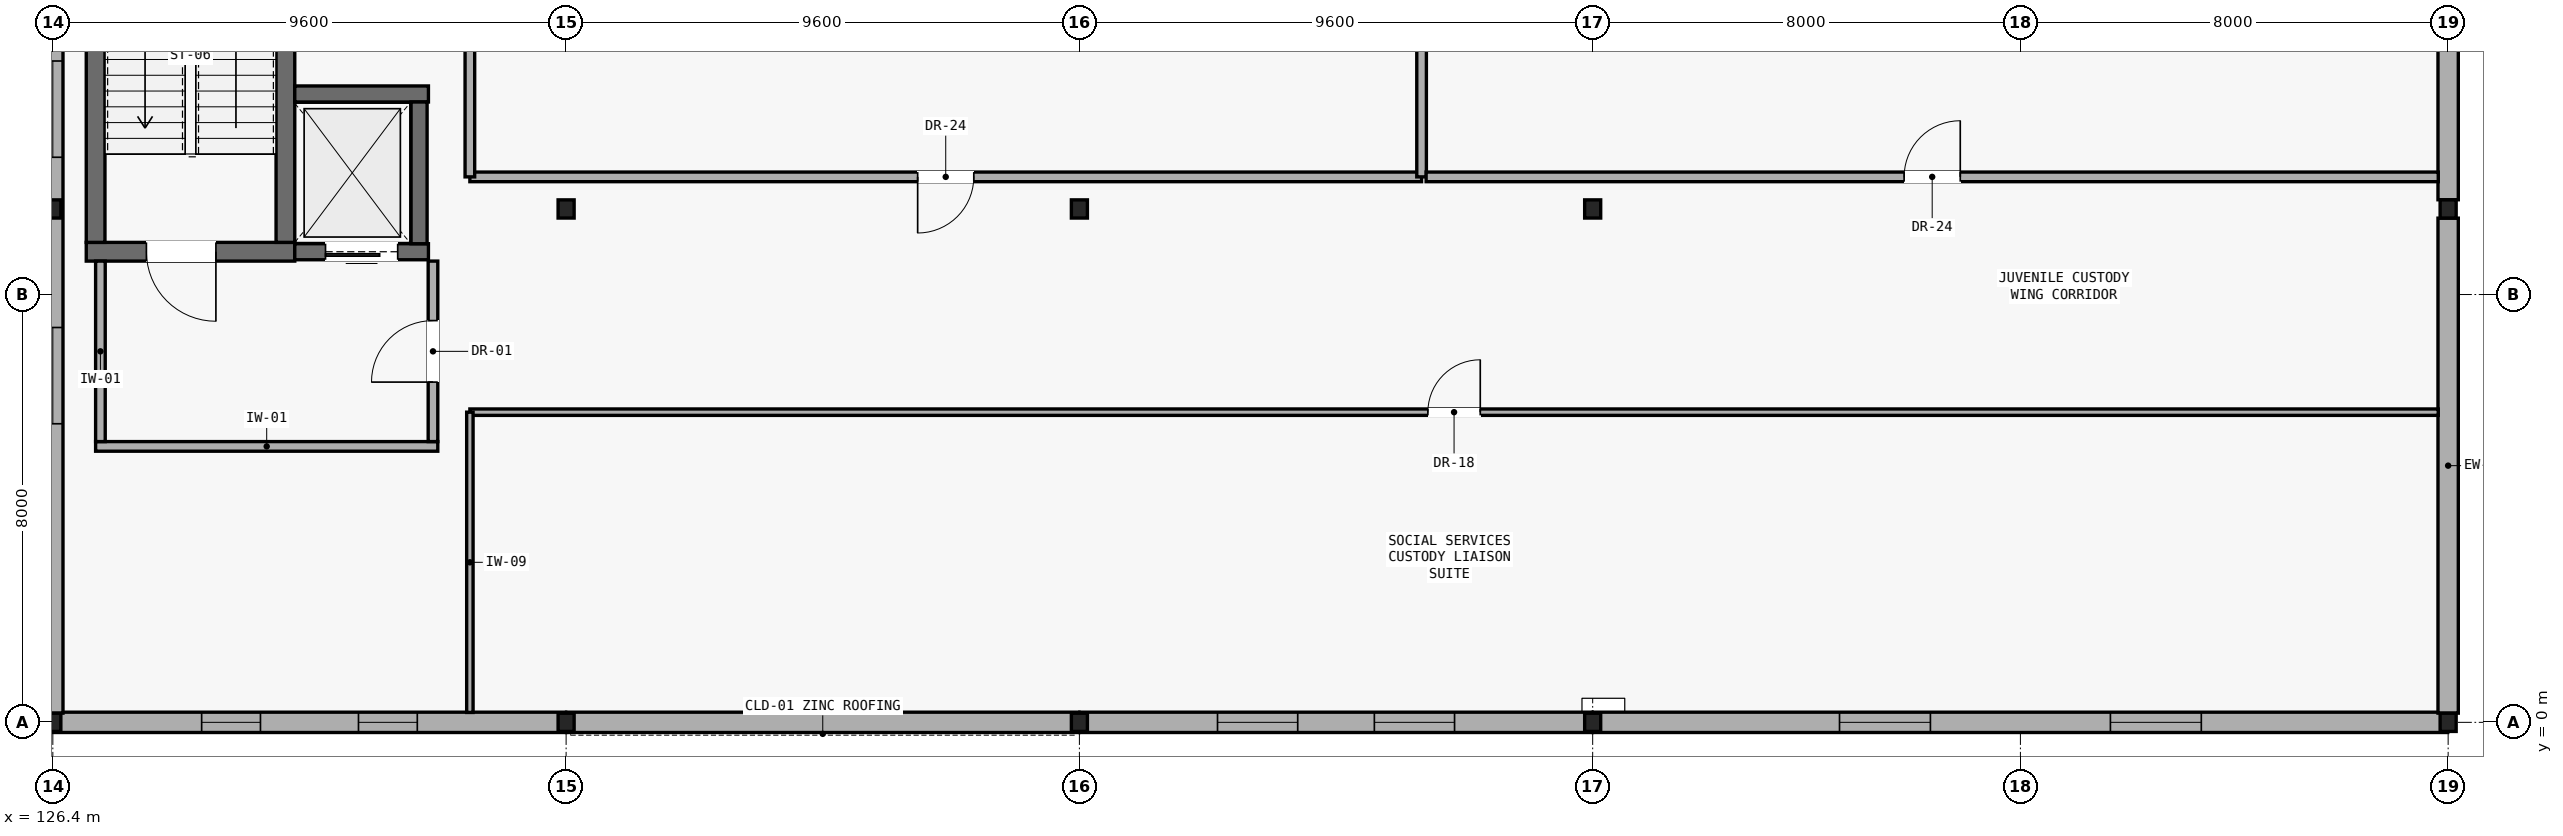
"""IFC4 building model, lengths in metres.
Left out: names, types, materials, properties, quantities, classifications, styles, units other than length and angle.
Written with IfcOpenShell. Run it as: python <this file> out.ifc"""

import sys

from ifc_helpers import new_model, si_unit, direction, frame, frame_2d, origin, origin_2d, place, context, subcontext, project, spatial, rectangle, i_section, extrude, element, fill, save


model = new_model("IFC4")
c1 = context("Model", 3, precision=1e-05, world=origin(), true_north=direction((0.0, 1.0)))
c2 = subcontext(c1, "Body", "Model", "MODEL_VIEW")
j1 = project(units=[si_unit("LENGTHUNIT", "METRE"), si_unit("PLANEANGLEUNIT", "RADIAN")], contexts=[c1])
p1 = place(None, origin())
s1 = spatial("IfcSite", under=j1, at=p1, CompositionType="ELEMENT")
p2 = place(p1, origin())
s2 = spatial("IfcBuilding", under=s1, at=p2, CompositionType="ELEMENT")
p3 = place(p2, frame((0.0, 0.0, 9.45)))
s3 = spatial("IfcBuildingStorey", under=s2, at=p3, CompositionType="ELEMENT", Elevation=9.45)
for number, where, z_axis, x_axis in (
    (1, (126.4, 0.0, 0.0), (0.0, 0.0, 1.0), (1.0, 0.0, 0.0)),
    (2, (126.4, 9.6, 0.0), (0.0, 0.0, 1.0), (1.0, 0.0, 0.0)),
    (3, (136.0, 0.0, 0.0), (0.0, 0.0, 1.0), (1.0, 0.0, 0.0)),
    (4, (136.0, 9.6, 0.0), (0.0, 0.0, 1.0), (1.0, 0.0, 0.0)),
    (5, (145.6, 0.0, 0.0), (0.0, 0.0, 1.0), (1.0, 0.0, 0.0)),
    (6, (145.6, 9.6, 0.0), (0.0, 0.0, 1.0), (1.0, 0.0, 0.0)),
    (7, (155.2, 0.0, 0.0), (0.0, 0.0, 1.0), (1.0, 0.0, 0.0)),
    (8, (155.2, 9.6, 0.0), (0.0, 0.0, 1.0), (1.0, 0.0, 0.0)),
    (9, (171.2, 0.0, 0.0), (0.0, 0.0, 1.0), (1.0, 0.0, 0.0)),
    (10, (171.2, 9.6, 0.0), (0.0, 0.0, 1.0), (1.0, 0.0, 0.0)),
):
    element("IfcColumn", number, at=place(p3, frame(where, z_axis=z_axis, x_axis=x_axis)), inside=s3, PredefinedType="COLUMN", context=c2, shape_type="SweptSolid", body=[
        extrude(i_section(OverallWidth=0.3, OverallDepth=0.34, WebThickness=0.012, FlangeThickness=0.021, FilletRadius=0.027, at=origin_2d()), origin(), (0.0, 0.0, 1.0), 4.2),
    ])
p4 = place(p3, frame((126.408, 0.0, 0.0), z_axis=(0.0, 0.0, 1.0), x_axis=(1.0, 0.0, 0.0)))
e11 = element("IfcWall", 11, at=p4, inside=s3, PredefinedType="SOLIDWALL", context=c2, shape_type="SweptSolid", body=[
    extrude(rectangle(XDim=9.584, YDim=0.38, at=frame_2d((4.792, 0.0))), origin(), (0.0, 0.0, 1.0), 3.64),
])
p5 = place(p4, frame((2.775, 0.0, 1.7)))
e12 = element("IfcOpeningElement", 12, at=p5, cuts=e11, PredefinedType="OPENING", context=c2, shape_type="SweptSolid", body=[
    extrude(rectangle(XDim=1.1, YDim=0.7, at=frame_2d((0.55, 0.35))), frame((0.0, 0.2, 0.0), z_axis=(0.0, -1.0, 0.0), x_axis=(1.0, 0.0, 0.0)), (0.0, 0.0, 1.0), 0.4),
])
p6 = place(p4, frame((5.709, 0.0, 1.7)))
e13 = element("IfcOpeningElement", 13, at=p6, cuts=e11, PredefinedType="OPENING", context=c2, shape_type="SweptSolid", body=[
    extrude(rectangle(XDim=1.1, YDim=0.7, at=frame_2d((0.55, 0.35))), frame((0.0, 0.2, 0.0), z_axis=(0.0, -1.0, 0.0), x_axis=(1.0, 0.0, 0.0)), (0.0, 0.0, 1.0), 0.4),
])
p7 = place(p3, frame((136.008, 0.0, 0.0), z_axis=(0.0, 0.0, 1.0), x_axis=(1.0, 0.0, 0.0)))
e14 = element("IfcWall", 14, at=p7, inside=s3, PredefinedType="SOLIDWALL", context=c2, shape_type="SweptSolid", body=[
    extrude(rectangle(XDim=9.584, YDim=0.38, at=frame_2d((4.792, 0.0))), origin(), (0.0, 0.0, 1.0), 3.635),
])
p8 = place(p3, frame((145.608, 0.0, 0.0), z_axis=(0.0, 0.0, 1.0), x_axis=(1.0, 0.0, 0.0)))
e15 = element("IfcWall", 15, at=p8, inside=s3, PredefinedType="SOLIDWALL", context=c2, shape_type="SweptSolid", body=[
    extrude(rectangle(XDim=9.584, YDim=0.38, at=frame_2d((4.792, 0.0))), origin(), (0.0, 0.0, 1.0), 3.635),
])
p9 = place(p8, frame((2.575, 0.0, 1.7)))
e16 = element("IfcOpeningElement", 16, at=p9, cuts=e15, PredefinedType="OPENING", context=c2, shape_type="SweptSolid", body=[
    extrude(rectangle(XDim=1.5, YDim=0.7, at=frame_2d((0.75, 0.35))), frame((0.0, 0.2, 0.0), z_axis=(0.0, -1.0, 0.0), x_axis=(1.0, 0.0, 0.0)), (0.0, 0.0, 1.0), 0.4),
])
p10 = place(p8, frame((5.509, 0.0, 1.7)))
e17 = element("IfcOpeningElement", 17, at=p10, cuts=e15, PredefinedType="OPENING", context=c2, shape_type="SweptSolid", body=[
    extrude(rectangle(XDim=1.5, YDim=0.7, at=frame_2d((0.75, 0.35))), frame((0.0, 0.2, 0.0), z_axis=(0.0, -1.0, 0.0), x_axis=(1.0, 0.0, 0.0)), (0.0, 0.0, 1.0), 0.4),
])
p11 = place(p3, frame((155.208, 0.0, 0.0), z_axis=(0.0, 0.0, 1.0), x_axis=(1.0, 0.0, 0.0)))
e18 = element("IfcWall", 18, at=p11, inside=s3, PredefinedType="SOLIDWALL", context=c2, shape_type="SweptSolid", body=[
    extrude(rectangle(XDim=15.984, YDim=0.38, at=frame_2d((7.992, 0.0))), origin(), (0.0, 0.0, 1.0), 3.405),
])
p12 = place(p11, frame((4.609, 0.0, 1.7)))
e19 = element("IfcOpeningElement", 19, at=p12, cuts=e18, PredefinedType="OPENING", context=c2, shape_type="SweptSolid", body=[
    extrude(rectangle(XDim=1.7, YDim=0.7, at=frame_2d((0.85, 0.35))), frame((0.0, 0.2, 0.0), z_axis=(0.0, -1.0, 0.0), x_axis=(1.0, 0.0, 0.0)), (0.0, 0.0, 1.0), 0.4),
])
p13 = place(p11, frame((9.675, 0.0, 1.7)))
e20 = element("IfcOpeningElement", 20, at=p13, cuts=e18, PredefinedType="OPENING", context=c2, shape_type="SweptSolid", body=[
    extrude(rectangle(XDim=1.7, YDim=0.7, at=frame_2d((0.85, 0.35))), frame((0.0, 0.2, 0.0), z_axis=(0.0, -1.0, 0.0), x_axis=(1.0, 0.0, 0.0)), (0.0, 0.0, 1.0), 0.4),
])
p14 = place(p3, frame((171.2, 0.172, 0.0), z_axis=(0.0, 0.0, 1.0), x_axis=(0.0, 1.0, 0.0)))
e21 = element("IfcWall", 21, at=p14, inside=s3, PredefinedType="SOLIDWALL", context=c2, shape_type="SweptSolid", body=[
    extrude(rectangle(XDim=9.256, YDim=0.38, at=frame_2d((4.628, 0.0))), origin(), (0.0, 0.0, 1.0), 3.505),
])
p15 = place(p3, frame((171.2, 9.772, 0.0), z_axis=(0.0, 0.0, 1.0), x_axis=(0.0, 1.0, 0.0)))
e22 = element("IfcWall", 22, at=p15, inside=s3, PredefinedType="SOLIDWALL", context=c2, shape_type="SweptSolid", body=[
    extrude(rectangle(XDim=7.456, YDim=0.38, at=frame_2d((3.728, 0.0))), origin(), (0.0, 0.0, 1.0), 3.525),
])
p16 = place(p15, frame((3.028, 0.0, 1.7)))
e23 = element("IfcOpeningElement", 23, at=p16, cuts=e22, PredefinedType="OPENING", context=c2, shape_type="SweptSolid", body=[
    extrude(rectangle(XDim=1.4, YDim=0.85, at=frame_2d((0.7, 0.425))), frame((0.0, 0.2, 0.0), z_axis=(0.0, -1.0, 0.0), x_axis=(1.0, 0.0, 0.0)), (0.0, 0.0, 1.0), 0.4),
])
p17 = place(p3, frame((126.4, 0.172, 0.0), z_axis=(0.0, 0.0, 1.0), x_axis=(0.0, 1.0, 0.0)))
e24 = element("IfcWall", 24, at=p17, inside=s3, PredefinedType="SOLIDWALL", context=c2, shape_type="SweptSolid", body=[
    extrude(rectangle(XDim=17.056, YDim=0.38, at=frame_2d((8.528, 0.0))), origin(), (0.0, 0.0, 1.0), 3.51),
])
p18 = place(p17, frame((5.411, 0.0, 1.7)))
e25 = element("IfcOpeningElement", 25, at=p18, cuts=e24, PredefinedType="OPENING", context=c2, shape_type="SweptSolid", body=[
    extrude(rectangle(XDim=1.8, YDim=0.85, at=frame_2d((0.9, 0.425))), frame((0.0, 0.2, 0.0), z_axis=(0.0, -1.0, 0.0), x_axis=(1.0, 0.0, 0.0)), (0.0, 0.0, 1.0), 0.4),
])
p19 = place(p17, frame((10.395, 0.0, 1.7)))
e26 = element("IfcOpeningElement", 26, at=p19, cuts=e24, PredefinedType="OPENING", context=c2, shape_type="SweptSolid", body=[
    extrude(rectangle(XDim=1.8, YDim=0.85, at=frame_2d((0.9, 0.425))), frame((0.0, 0.2, 0.0), z_axis=(0.0, -1.0, 0.0), x_axis=(1.0, 0.0, 0.0)), (0.0, 0.0, 1.0), 0.4),
])
p20 = place(p3, frame((127.025, 8.8, 0.0), z_axis=(0.0, 0.0, 1.0), x_axis=(1.0, 0.0, 0.0)))
e27 = element("IfcWall", 27, at=p20, inside=s3, PredefinedType="SHEAR", context=c2, shape_type="SweptSolid", body=[
    extrude(rectangle(XDim=3.9, YDim=0.35, at=frame_2d((1.95, 0.0))), origin(), (0.0, 0.0, 1.0), 3.97),
])
p21 = place(p20, frame((1.125, 0.0, 0.0)))
e28 = element("IfcOpeningElement", 28, at=p21, cuts=e27, PredefinedType="OPENING", context=c2, shape_type="SweptSolid", body=[
    extrude(rectangle(XDim=1.3, YDim=2.15, at=frame_2d((0.65, 1.075))), frame((0.0, 0.185, 0.0), z_axis=(0.0, -1.0, 0.0), x_axis=(1.0, 0.0, 0.0)), (0.0, 0.0, 1.0), 0.37),
])
for number, where, z_axis, x_axis in (
    (29, (127.2, 8.975, 0.0), (0.0, 0.0, 1.0), (0.0, 1.0, 0.0)),
    (30, (130.75, 8.975, 0.0), (0.0, 0.0, 1.0), (0.0, 1.0, 0.0)),
):
    element("IfcWall", number, at=place(p3, frame(where, z_axis=z_axis, x_axis=x_axis)), inside=s3, PredefinedType="SHEAR", context=c2, shape_type="SweptSolid", body=[
        extrude(rectangle(XDim=7.6, YDim=0.35, at=frame_2d((3.8, 0.0))), origin(), (0.0, 0.0, 1.0), 3.97),
    ])
p22 = place(p3, frame((130.925, 8.8, 0.0), z_axis=(0.0, 0.0, 1.0), x_axis=(1.0, 0.0, 0.0)))
e31 = element("IfcWall", 31, at=p22, inside=s3, PredefinedType="SHEAR", context=c2, shape_type="SweptSolid", body=[
    extrude(rectangle(XDim=2.5, YDim=0.3, at=frame_2d((1.25, 0.0))), origin(), (0.0, 0.0, 1.0), 3.97),
])
p23 = place(p22, frame((0.575, 0.0, 0.0)))
e32 = element("IfcOpeningElement", 32, at=p23, cuts=e31, PredefinedType="OPENING", context=c2, shape_type="SweptSolid", body=[
    extrude(rectangle(XDim=1.35, YDim=2.15, at=frame_2d((0.675, 1.075))), frame((0.0, 0.16, 0.0), z_axis=(0.0, -1.0, 0.0), x_axis=(1.0, 0.0, 0.0)), (0.0, 0.0, 1.0), 0.32),
])
p24 = place(p3, frame((130.925, 11.75, 0.0), z_axis=(0.0, 0.0, 1.0), x_axis=(1.0, 0.0, 0.0)))
e33 = element("IfcWall", 33, at=p24, inside=s3, PredefinedType="SHEAR", context=c2, shape_type="SweptSolid", body=[
    extrude(rectangle(XDim=2.5, YDim=0.3, at=frame_2d((1.25, 0.0))), origin(), (0.0, 0.0, 1.0), 3.97),
])
p25 = place(p3, frame((133.25, 8.95, 0.0), z_axis=(0.0, 0.0, 1.0), x_axis=(0.0, 1.0, 0.0)))
e34 = element("IfcWall", 34, at=p25, inside=s3, PredefinedType="SHEAR", context=c2, shape_type="SweptSolid", body=[
    extrude(rectangle(XDim=2.65, YDim=0.3, at=frame_2d((1.325, 0.0))), origin(), (0.0, 0.0, 1.0), 3.97),
])
p26 = place(p3, frame((127.2, 5.16, 0.0), z_axis=(0.0, 0.0, 1.0), x_axis=(1.0, 0.0, 0.0)))
e35 = element("IfcWall", 35, at=p26, inside=s3, PredefinedType="PARTITIONING", context=c2, shape_type="SweptSolid", body=[
    extrude(rectangle(XDim=6.4, YDim=0.18, at=frame_2d((3.2, 0.0))), origin(), (0.0, 0.0, 1.0), 3.97),
])
p27 = place(p3, frame((127.29, 5.25, 0.0), z_axis=(0.0, 0.0, 1.0), x_axis=(0.0, 1.0, 0.0)))
e36 = element("IfcWall", 36, at=p27, inside=s3, PredefinedType="PARTITIONING", context=c2, shape_type="SweptSolid", body=[
    extrude(rectangle(XDim=3.375, YDim=0.18, at=frame_2d((1.688, 0.0))), origin(), (0.0, 0.0, 1.0), 3.97),
])
p28 = place(p3, frame((133.51, 5.25, 0.0), z_axis=(0.0, 0.0, 1.0), x_axis=(0.0, 1.0, 0.0)))
e37 = element("IfcWall", 37, at=p28, inside=s3, PredefinedType="PARTITIONING", context=c2, shape_type="SweptSolid", body=[
    extrude(rectangle(XDim=3.375, YDim=0.18, at=frame_2d((1.688, 0.0))), origin(), (0.0, 0.0, 1.0), 3.97),
])
p29 = place(p28, frame((1.113, 0.0, 0.0)))
e38 = element("IfcOpeningElement", 38, at=p29, cuts=e37, PredefinedType="OPENING", context=c2, shape_type="SweptSolid", body=[
    extrude(rectangle(XDim=1.15, YDim=2.15, at=frame_2d((0.575, 1.075))), frame((0.0, 0.1, 0.0), z_axis=(0.0, -1.0, 0.0), x_axis=(1.0, 0.0, 0.0)), (0.0, 0.0, 1.0), 0.2),
])
p30 = place(p3, frame((134.2, 10.2, 0.0), z_axis=(0.0, 0.0, 1.0), x_axis=(1.0, 0.0, 0.0)))
e39 = element("IfcWall", 39, at=p30, inside=s3, PredefinedType="PARTITIONING", context=c2, shape_type="SweptSolid", body=[
    extrude(rectangle(XDim=17.8, YDim=0.18, at=frame_2d((8.9, 0.0))), origin(), (0.0, 0.0, 1.0), 3.97),
])
p31 = place(p30, frame((8.375, 0.0, 0.0)))
e40 = element("IfcOpeningElement", 40, at=p31, cuts=e39, PredefinedType="OPENING", context=c2, shape_type="SweptSolid", body=[
    extrude(rectangle(XDim=1.05, YDim=2.1, at=frame_2d((0.525, 1.05))), frame((0.0, 0.1, 0.0), z_axis=(0.0, -1.0, 0.0), x_axis=(1.0, 0.0, 0.0)), (0.0, 0.0, 1.0), 0.2),
])
for number, where, z_axis, x_axis in (
    (41, (152.0, 10.2, 0.0), (0.0, 0.0, 1.0), (0.0, 1.0, 0.0)),
    (42, (134.2, 17.215, 0.0), (0.0, 0.0, 1.0), (0.0, -1.0, 0.0)),
):
    element("IfcWall", number, at=place(p3, frame(where, z_axis=z_axis, x_axis=x_axis)), inside=s3, PredefinedType="PARTITIONING", context=c2, shape_type="SweptSolid", body=[
        extrude(rectangle(XDim=7.015, YDim=0.18, at=frame_2d((3.508, 0.0))), origin(), (0.0, 0.0, 1.0), 3.97),
    ])
p32 = place(p3, frame((152.085, 10.2, 0.0), z_axis=(0.0, 0.0, 1.0), x_axis=(1.0, 0.0, 0.0)))
e43 = element("IfcWall", 43, at=p32, inside=s3, PredefinedType="PARTITIONING", context=c2, shape_type="SweptSolid", body=[
    extrude(rectangle(XDim=18.93, YDim=0.18, at=frame_2d((9.465, 0.0))), origin(), (0.0, 0.0, 1.0), 3.97),
])
p33 = place(p32, frame((8.94, 0.0, 0.0)))
e44 = element("IfcOpeningElement", 44, at=p33, cuts=e43, PredefinedType="OPENING", context=c2, shape_type="SweptSolid", body=[
    extrude(rectangle(XDim=1.05, YDim=2.1, at=frame_2d((0.525, 1.05))), frame((0.0, 0.1, 0.0), z_axis=(0.0, -1.0, 0.0), x_axis=(1.0, 0.0, 0.0)), (0.0, 0.0, 1.0), 0.2),
])
p34 = place(p3, frame((171.015, 5.8, 0.0), z_axis=(0.0, 0.0, 1.0), x_axis=(-1.0, 0.0, 0.0)))
e45 = element("IfcWall", 45, at=p34, inside=s3, PredefinedType="PARTITIONING", context=c2, shape_type="SweptSolid", body=[
    extrude(rectangle(XDim=36.815, YDim=0.12, at=frame_2d((18.407, 0.0))), origin(), (0.0, 0.0, 1.0), 3.97),
])
p35 = place(p34, frame((17.917, 0.0, 0.0)))
e46 = element("IfcOpeningElement", 46, at=p35, cuts=e45, PredefinedType="OPENING", context=c2, shape_type="SweptSolid", body=[
    extrude(rectangle(XDim=0.98, YDim=2.1, at=frame_2d((0.49, 1.05))), frame((0.0, 0.07, 0.0), z_axis=(0.0, -1.0, 0.0), x_axis=(1.0, 0.0, 0.0)), (0.0, 0.0, 1.0), 0.14),
])
p36 = place(p3, frame((134.2, 5.8, 0.0), z_axis=(0.0, 0.0, 1.0), x_axis=(0.0, -1.0, 0.0)))
e47 = element("IfcWall", 47, at=p36, inside=s3, PredefinedType="PARTITIONING", context=c2, shape_type="SweptSolid", body=[
    extrude(rectangle(XDim=5.615, YDim=0.12, at=frame_2d((2.808, 0.0))), origin(), (0.0, 0.0, 1.0), 3.97),
])
p37 = place(p5, origin())
e48 = element("IfcWindow", 48, at=p37, inside=s3, PartitioningType="SINGLE_PANEL", PredefinedType="WINDOW", context=c2, shape_type="SweptSolid", body=[
    extrude(rectangle(XDim=1.1, YDim=0.7, at=frame_2d((0.55, 0.35))), frame((0.0, 0.03, 0.0), z_axis=(0.0, -1.0, 0.0), x_axis=(1.0, 0.0, 0.0)), (0.0, 0.0, 1.0), 0.06),
])
fill(e12, e48)
p38 = place(p6, origin())
e49 = element("IfcWindow", 49, at=p38, inside=s3, PartitioningType="SINGLE_PANEL", PredefinedType="WINDOW", context=c2, shape_type="SweptSolid", body=[
    extrude(rectangle(XDim=1.1, YDim=0.7, at=frame_2d((0.55, 0.35))), frame((0.0, 0.03, 0.0), z_axis=(0.0, -1.0, 0.0), x_axis=(1.0, 0.0, 0.0)), (0.0, 0.0, 1.0), 0.06),
])
fill(e13, e49)
p39 = place(p9, origin())
e50 = element("IfcWindow", 50, at=p39, inside=s3, PartitioningType="SINGLE_PANEL", PredefinedType="WINDOW", context=c2, shape_type="SweptSolid", body=[
    extrude(rectangle(XDim=1.5, YDim=0.7, at=frame_2d((0.75, 0.35))), frame((0.0, 0.03, 0.0), z_axis=(0.0, -1.0, 0.0), x_axis=(1.0, 0.0, 0.0)), (0.0, 0.0, 1.0), 0.06),
])
fill(e16, e50)
p40 = place(p10, origin())
e51 = element("IfcWindow", 51, at=p40, inside=s3, PartitioningType="SINGLE_PANEL", PredefinedType="WINDOW", context=c2, shape_type="SweptSolid", body=[
    extrude(rectangle(XDim=1.5, YDim=0.7, at=frame_2d((0.75, 0.35))), frame((0.0, 0.03, 0.0), z_axis=(0.0, -1.0, 0.0), x_axis=(1.0, 0.0, 0.0)), (0.0, 0.0, 1.0), 0.06),
])
fill(e17, e51)
p41 = place(p12, origin())
e52 = element("IfcWindow", 52, at=p41, inside=s3, PartitioningType="SINGLE_PANEL", PredefinedType="WINDOW", context=c2, shape_type="SweptSolid", body=[
    extrude(rectangle(XDim=1.7, YDim=0.7, at=frame_2d((0.85, 0.35))), frame((0.0, 0.03, 0.0), z_axis=(0.0, -1.0, 0.0), x_axis=(1.0, 0.0, 0.0)), (0.0, 0.0, 1.0), 0.06),
])
fill(e19, e52)
p42 = place(p13, origin())
e53 = element("IfcWindow", 53, at=p42, inside=s3, PartitioningType="SINGLE_PANEL", PredefinedType="WINDOW", context=c2, shape_type="SweptSolid", body=[
    extrude(rectangle(XDim=1.7, YDim=0.7, at=frame_2d((0.85, 0.35))), frame((0.0, 0.03, 0.0), z_axis=(0.0, -1.0, 0.0), x_axis=(1.0, 0.0, 0.0)), (0.0, 0.0, 1.0), 0.06),
])
fill(e20, e53)
p43 = place(p18, origin())
e54 = element("IfcWindow", 54, at=p43, inside=s3, PartitioningType="SINGLE_PANEL", PredefinedType="WINDOW", context=c2, shape_type="SweptSolid", body=[
    extrude(rectangle(XDim=1.8, YDim=0.85, at=frame_2d((0.9, 0.425))), frame((0.0, 0.03, 0.0), z_axis=(0.0, -1.0, 0.0), x_axis=(1.0, 0.0, 0.0)), (0.0, 0.0, 1.0), 0.06),
])
fill(e25, e54)
p44 = place(p19, origin())
e55 = element("IfcWindow", 55, at=p44, inside=s3, PartitioningType="SINGLE_PANEL", PredefinedType="WINDOW", context=c2, shape_type="SweptSolid", body=[
    extrude(rectangle(XDim=1.8, YDim=0.85, at=frame_2d((0.9, 0.425))), frame((0.0, 0.03, 0.0), z_axis=(0.0, -1.0, 0.0), x_axis=(1.0, 0.0, 0.0)), (0.0, 0.0, 1.0), 0.06),
])
fill(e26, e55)
p45 = place(p21, frame((1.3, 0.0, 0.0), z_axis=(0.0, 0.0, 1.0), x_axis=(-1.0, 0.0, 0.0)))
e56 = element("IfcDoor", 56, at=p45, inside=s3, OperationType="SINGLE_SWING_RIGHT", PredefinedType="DOOR", context=c2, shape_type="SweptSolid", body=[
    extrude(rectangle(XDim=1.3, YDim=2.15, at=frame_2d((0.65, 1.075))), frame((0.0, 0.025, 0.0), z_axis=(0.0, -1.0, 0.0), x_axis=(1.0, 0.0, 0.0)), (0.0, 0.0, 1.0), 0.05),
])
fill(e28, e56)
p46 = place(p23, frame((1.35, 0.0, 0.0), z_axis=(0.0, 0.0, 1.0), x_axis=(-1.0, 0.0, 0.0)))
e57 = element("IfcDoor", 57, at=p46, inside=s3, OperationType="SLIDING_TO_RIGHT", PredefinedType="DOOR", context=c2, shape_type="SweptSolid", body=[
    extrude(rectangle(XDim=1.35, YDim=2.15, at=frame_2d((0.675, 1.075))), frame((0.0, 0.025, 0.0), z_axis=(0.0, -1.0, 0.0), x_axis=(1.0, 0.0, 0.0)), (0.0, 0.0, 1.0), 0.05),
])
fill(e32, e57)
p47 = place(p29, origin())
e58 = element("IfcDoor", 58, at=p47, inside=s3, OperationType="SINGLE_SWING_LEFT", PredefinedType="DOOR", context=c2, shape_type="SweptSolid", body=[
    extrude(rectangle(XDim=1.15, YDim=2.15, at=frame_2d((0.575, 1.075))), frame((0.0, 0.025, 0.0), z_axis=(0.0, -1.0, 0.0), x_axis=(1.0, 0.0, 0.0)), (0.0, 0.0, 1.0), 0.05),
])
fill(e38, e58)
p48 = place(p31, frame((1.05, 0.0, 0.0), z_axis=(0.0, 0.0, 1.0), x_axis=(-1.0, 0.0, 0.0)))
e59 = element("IfcDoor", 59, at=p48, inside=s3, OperationType="SINGLE_SWING_LEFT", PredefinedType="DOOR", context=c2, shape_type="SweptSolid", body=[
    extrude(rectangle(XDim=1.05, YDim=2.1, at=frame_2d((0.525, 1.05))), frame((0.0, 0.025, 0.0), z_axis=(0.0, -1.0, 0.0), x_axis=(1.0, 0.0, 0.0)), (0.0, 0.0, 1.0), 0.05),
])
fill(e40, e59)
p49 = place(p33, origin())
e60 = element("IfcDoor", 60, at=p49, inside=s3, OperationType="SINGLE_SWING_RIGHT", PredefinedType="DOOR", context=c2, shape_type="SweptSolid", body=[
    extrude(rectangle(XDim=1.05, YDim=2.1, at=frame_2d((0.525, 1.05))), frame((0.0, 0.025, 0.0), z_axis=(0.0, -1.0, 0.0), x_axis=(1.0, 0.0, 0.0)), (0.0, 0.0, 1.0), 0.05),
])
fill(e44, e60)
p50 = place(p35, frame((0.98, 0.0, 0.0), z_axis=(0.0, 0.0, 1.0), x_axis=(-1.0, 0.0, 0.0)))
e61 = element("IfcDoor", 61, at=p50, inside=s3, OperationType="SINGLE_SWING_LEFT", PredefinedType="DOOR", context=c2, shape_type="SweptSolid", body=[
    extrude(rectangle(XDim=0.98, YDim=2.1, at=frame_2d((0.49, 1.05))), frame((0.0, 0.025, 0.0), z_axis=(0.0, -1.0, 0.0), x_axis=(1.0, 0.0, 0.0)), (0.0, 0.0, 1.0), 0.05),
])
fill(e46, e61)
save(model, sys.argv[1])
